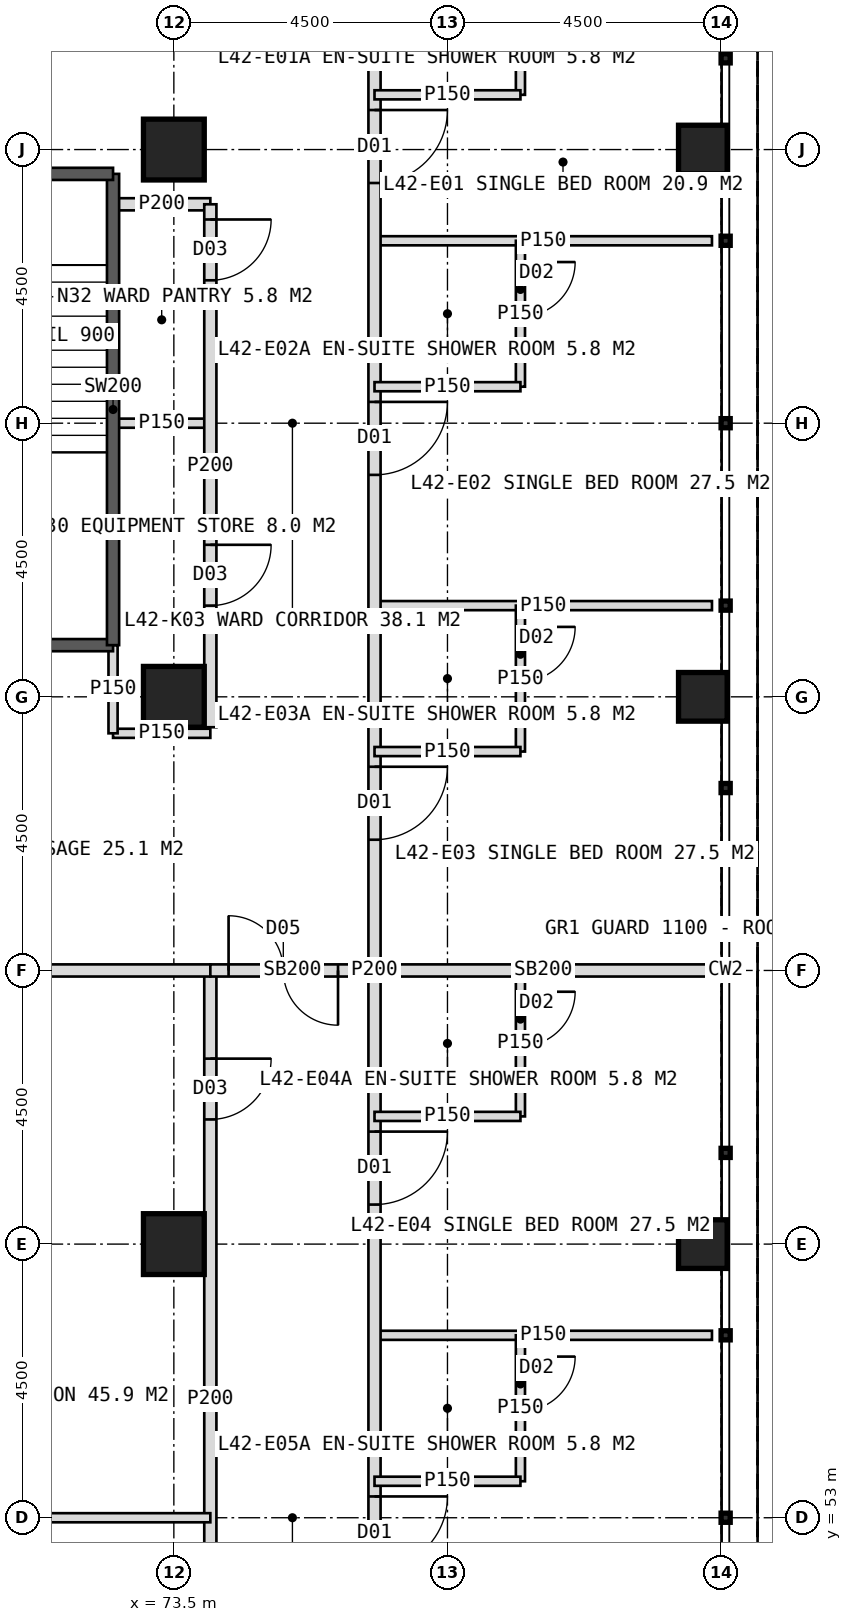
"""IFC4 building model, lengths in metres.
Left out: names, types, materials, properties, quantities, classifications, styles, units other than length and angle.
Written with IfcOpenShell. Run it as: python <this file> out.ifc"""

import sys

from ifc_helpers import new_model, si_unit, direction, frame, frame_2d, origin, origin_2d, place, context, subcontext, project, spatial, rectangle, hollow_rectangle, extrude, element, fill, save


model = new_model("IFC4")
c1 = context("Model", 3, precision=1e-05, world=origin(), true_north=direction((0.0, 1.0)))
c2 = subcontext(c1, "Body", "Model", "MODEL_VIEW")
j1 = project(units=[si_unit("LENGTHUNIT", "METRE"), si_unit("PLANEANGLEUNIT", "RADIAN")], contexts=[c1])
p1 = place(None, origin())
s1 = spatial("IfcSite", under=j1, at=p1, CompositionType="ELEMENT")
p2 = place(p1, origin())
s2 = spatial("IfcBuilding", under=s1, at=p2, CompositionType="ELEMENT")
p3 = place(p2, frame((0.0, 0.0, 177.0)))
s3 = spatial("IfcBuildingStorey", under=s2, at=p3, CompositionType="ELEMENT", Elevation=177.0)
for number, where, z_axis, x_axis in (
    (1, (73.5, 75.5, 0.0), (0.0, 0.0, 1.0), (1.0, 0.0, 0.0)),
    (2, (73.5, 57.5, 0.0), (0.0, 0.0, 1.0), (1.0, 0.0, 0.0)),
    (3, (73.5, 66.5, 0.0), (0.0, 0.0, 1.0), (1.0, 0.0, 0.0)),
):
    element("IfcColumn", number, at=place(p3, frame(where, z_axis=z_axis, x_axis=x_axis)), inside=s3, PredefinedType="COLUMN", context=c2, shape_type="SweptSolid", body=[
        extrude(hollow_rectangle(XDim=1.0, YDim=1.0, WallThickness=0.1, at=origin_2d()), origin(), (0.0, 0.0, 1.0), 4.0),
    ])
for number, where, z_axis, x_axis in (
    (4, (82.2, 57.5, 0.0), (0.0, 0.0, 1.0), (1.0, 0.0, 0.0)),
    (5, (82.2, 66.5, 0.0), (0.0, 0.0, 1.0), (1.0, 0.0, 0.0)),
    (6, (82.2, 75.5, 0.0), (0.0, 0.0, 1.0), (1.0, 0.0, 0.0)),
):
    element("IfcColumn", number, at=place(p3, frame(where, z_axis=z_axis, x_axis=x_axis)), inside=s3, PredefinedType="COLUMN", context=c2, shape_type="SweptSolid", body=[
        extrude(hollow_rectangle(XDim=0.8, YDim=0.8, WallThickness=0.08, at=origin_2d()), origin(), (0.0, 0.0, 1.0), 4.0),
    ])
p4 = place(p3, frame((72.5, 74.6, 0.0), z_axis=(0.0, 0.0, 1.0), x_axis=(1.0, 0.0, 0.0)))
e7 = element("IfcWall", 7, at=p4, inside=s3, PredefinedType="PARTITIONING", context=c2, shape_type="SweptSolid", body=[
    extrude(rectangle(XDim=1.6, YDim=0.2, at=frame_2d((0.8, 0.0))), origin(), (0.0, 0.0, 1.0), 3.75),
])
for number, where, z_axis, x_axis in (
    (8, (76.8, 74.0, 0.0), (0.0, 0.0, 1.0), (1.0, 0.0, 0.0)),
    (9, (76.8, 68.0, 0.0), (0.0, 0.0, 1.0), (1.0, 0.0, 0.0)),
):
    element("IfcWall", number, at=place(p3, frame(where, z_axis=z_axis, x_axis=x_axis)), inside=s3, PredefinedType="PARTITIONING", context=c2, shape_type="SweptSolid", body=[
        extrude(rectangle(XDim=5.55, YDim=0.15, at=frame_2d((2.775, 0.0))), origin(), (0.0, 0.0, 1.0), 3.75),
    ])
p5 = place(p3, frame((76.8, 62.0, 0.0), z_axis=(0.0, 0.0, 1.0), x_axis=(1.0, 0.0, 0.0)))
e10 = element("IfcWall", 10, at=p5, inside=s3, PredefinedType="SOLIDWALL", context=c2, shape_type="SweptSolid", body=[
    extrude(rectangle(XDim=5.55, YDim=0.2, at=frame_2d((2.775, 0.0))), origin(), (0.0, 0.0, 1.0), 2.95),
])
p6 = place(p3, frame((76.8, 56.0, 0.0), z_axis=(0.0, 0.0, 1.0), x_axis=(1.0, 0.0, 0.0)))
e11 = element("IfcWall", 11, at=p6, inside=s3, PredefinedType="PARTITIONING", context=c2, shape_type="SweptSolid", body=[
    extrude(rectangle(XDim=5.55, YDim=0.15, at=frame_2d((2.775, 0.0))), origin(), (0.0, 0.0, 1.0), 3.75),
])
p7 = place(p3, frame((76.8, 78.8, 0.0), z_axis=(0.0, 0.0, 1.0), x_axis=(0.0, -1.0, 0.0)))
e12 = element("IfcWall", 12, at=p7, inside=s3, PredefinedType="PARTITIONING", context=c2, shape_type="SweptSolid", body=[
    extrude(rectangle(XDim=33.6, YDim=0.2, at=frame_2d((16.8, 0.0))), origin(), (0.0, 0.0, 1.0), 3.75),
])
p8 = place(p7, frame((2.65, 0.0, 0.0)))
e13 = element("IfcOpeningElement", 13, at=p8, cuts=e12, PredefinedType="OPENING", context=c2, shape_type="SweptSolid", body=[
    extrude(rectangle(XDim=1.2, YDim=2.2, at=frame_2d((0.6, 1.1))), frame((0.0, 0.11, 0.0), z_axis=(0.0, -1.0, 0.0), x_axis=(1.0, 0.0, 0.0)), (0.0, 0.0, 1.0), 0.22),
])
p9 = place(p7, frame((7.45, 0.0, 0.0)))
e14 = element("IfcOpeningElement", 14, at=p9, cuts=e12, PredefinedType="OPENING", context=c2, shape_type="SweptSolid", body=[
    extrude(rectangle(XDim=1.2, YDim=2.2, at=frame_2d((0.6, 1.1))), frame((0.0, 0.11, 0.0), z_axis=(0.0, -1.0, 0.0), x_axis=(1.0, 0.0, 0.0)), (0.0, 0.0, 1.0), 0.22),
])
p10 = place(p7, frame((13.45, 0.0, 0.0)))
e15 = element("IfcOpeningElement", 15, at=p10, cuts=e12, PredefinedType="OPENING", context=c2, shape_type="SweptSolid", body=[
    extrude(rectangle(XDim=1.2, YDim=2.2, at=frame_2d((0.6, 1.1))), frame((0.0, 0.11, 0.0), z_axis=(0.0, -1.0, 0.0), x_axis=(1.0, 0.0, 0.0)), (0.0, 0.0, 1.0), 0.22),
])
p11 = place(p7, frame((19.45, 0.0, 0.0)))
e16 = element("IfcOpeningElement", 16, at=p11, cuts=e12, PredefinedType="OPENING", context=c2, shape_type="SweptSolid", body=[
    extrude(rectangle(XDim=1.2, YDim=2.2, at=frame_2d((0.6, 1.1))), frame((0.0, 0.11, 0.0), z_axis=(0.0, -1.0, 0.0), x_axis=(1.0, 0.0, 0.0)), (0.0, 0.0, 1.0), 0.22),
])
p12 = place(p7, frame((25.45, 0.0, 0.0)))
e17 = element("IfcOpeningElement", 17, at=p12, cuts=e12, PredefinedType="OPENING", context=c2, shape_type="SweptSolid", body=[
    extrude(rectangle(XDim=1.2, YDim=2.2, at=frame_2d((0.6, 1.1))), frame((0.0, 0.11, 0.0), z_axis=(0.0, -1.0, 0.0), x_axis=(1.0, 0.0, 0.0)), (0.0, 0.0, 1.0), 0.22),
])
p13 = place(p3, frame((79.2, 78.8, 0.0), z_axis=(0.0, 0.0, 1.0), x_axis=(0.0, -1.0, 0.0)))
e18 = element("IfcWall", 18, at=p13, inside=s3, PredefinedType="PARTITIONING", context=c2, shape_type="SweptSolid", body=[
    extrude(rectangle(XDim=2.4, YDim=0.15, at=frame_2d((1.2, 0.0))), origin(), (0.0, 0.0, 1.0), 3.75),
])
p14 = place(p13, frame((0.35, 0.0, 0.0)))
e19 = element("IfcOpeningElement", 19, at=p14, cuts=e18, PredefinedType="OPENING", context=c2, shape_type="SweptSolid", body=[
    extrude(rectangle(XDim=0.9, YDim=2.1, at=frame_2d((0.45, 1.05))), frame((0.0, 0.085, 0.0), z_axis=(0.0, -1.0, 0.0), x_axis=(1.0, 0.0, 0.0)), (0.0, 0.0, 1.0), 0.17),
])
p15 = place(p3, frame((76.8, 76.4, 0.0), z_axis=(0.0, 0.0, 1.0), x_axis=(1.0, 0.0, 0.0)))
e20 = element("IfcWall", 20, at=p15, inside=s3, PredefinedType="PARTITIONING", context=c2, shape_type="SweptSolid", body=[
    extrude(rectangle(XDim=2.4, YDim=0.15, at=frame_2d((1.2, 0.0))), origin(), (0.0, 0.0, 1.0), 3.75),
])
p16 = place(p3, frame((79.2, 74.0, 0.0), z_axis=(0.0, 0.0, 1.0), x_axis=(0.0, -1.0, 0.0)))
e21 = element("IfcWall", 21, at=p16, inside=s3, PredefinedType="PARTITIONING", context=c2, shape_type="SweptSolid", body=[
    extrude(rectangle(XDim=2.4, YDim=0.15, at=frame_2d((1.2, 0.0))), origin(), (0.0, 0.0, 1.0), 3.75),
])
p17 = place(p16, frame((0.35, 0.0, 0.0)))
e22 = element("IfcOpeningElement", 22, at=p17, cuts=e21, PredefinedType="OPENING", context=c2, shape_type="SweptSolid", body=[
    extrude(rectangle(XDim=0.9, YDim=2.1, at=frame_2d((0.45, 1.05))), frame((0.0, 0.085, 0.0), z_axis=(0.0, -1.0, 0.0), x_axis=(1.0, 0.0, 0.0)), (0.0, 0.0, 1.0), 0.17),
])
p18 = place(p3, frame((76.8, 71.6, 0.0), z_axis=(0.0, 0.0, 1.0), x_axis=(1.0, 0.0, 0.0)))
e23 = element("IfcWall", 23, at=p18, inside=s3, PredefinedType="PARTITIONING", context=c2, shape_type="SweptSolid", body=[
    extrude(rectangle(XDim=2.4, YDim=0.15, at=frame_2d((1.2, 0.0))), origin(), (0.0, 0.0, 1.0), 3.75),
])
p19 = place(p3, frame((79.2, 68.0, 0.0), z_axis=(0.0, 0.0, 1.0), x_axis=(0.0, -1.0, 0.0)))
e24 = element("IfcWall", 24, at=p19, inside=s3, PredefinedType="PARTITIONING", context=c2, shape_type="SweptSolid", body=[
    extrude(rectangle(XDim=2.4, YDim=0.15, at=frame_2d((1.2, 0.0))), origin(), (0.0, 0.0, 1.0), 3.75),
])
p20 = place(p19, frame((0.35, 0.0, 0.0)))
e25 = element("IfcOpeningElement", 25, at=p20, cuts=e24, PredefinedType="OPENING", context=c2, shape_type="SweptSolid", body=[
    extrude(rectangle(XDim=0.9, YDim=2.1, at=frame_2d((0.45, 1.05))), frame((0.0, 0.085, 0.0), z_axis=(0.0, -1.0, 0.0), x_axis=(1.0, 0.0, 0.0)), (0.0, 0.0, 1.0), 0.17),
])
p21 = place(p3, frame((76.8, 65.6, 0.0), z_axis=(0.0, 0.0, 1.0), x_axis=(1.0, 0.0, 0.0)))
e26 = element("IfcWall", 26, at=p21, inside=s3, PredefinedType="PARTITIONING", context=c2, shape_type="SweptSolid", body=[
    extrude(rectangle(XDim=2.4, YDim=0.15, at=frame_2d((1.2, 0.0))), origin(), (0.0, 0.0, 1.0), 3.75),
])
p22 = place(p3, frame((79.2, 62.0, 0.0), z_axis=(0.0, 0.0, 1.0), x_axis=(0.0, -1.0, 0.0)))
e27 = element("IfcWall", 27, at=p22, inside=s3, PredefinedType="PARTITIONING", context=c2, shape_type="SweptSolid", body=[
    extrude(rectangle(XDim=2.4, YDim=0.15, at=frame_2d((1.2, 0.0))), origin(), (0.0, 0.0, 1.0), 3.75),
])
p23 = place(p22, frame((0.35, 0.0, 0.0)))
e28 = element("IfcOpeningElement", 28, at=p23, cuts=e27, PredefinedType="OPENING", context=c2, shape_type="SweptSolid", body=[
    extrude(rectangle(XDim=0.9, YDim=2.1, at=frame_2d((0.45, 1.05))), frame((0.0, 0.085, 0.0), z_axis=(0.0, -1.0, 0.0), x_axis=(1.0, 0.0, 0.0)), (0.0, 0.0, 1.0), 0.17),
])
p24 = place(p3, frame((76.8, 59.6, 0.0), z_axis=(0.0, 0.0, 1.0), x_axis=(1.0, 0.0, 0.0)))
e29 = element("IfcWall", 29, at=p24, inside=s3, PredefinedType="PARTITIONING", context=c2, shape_type="SweptSolid", body=[
    extrude(rectangle(XDim=2.4, YDim=0.15, at=frame_2d((1.2, 0.0))), origin(), (0.0, 0.0, 1.0), 3.75),
])
p25 = place(p3, frame((79.2, 56.0, 0.0), z_axis=(0.0, 0.0, 1.0), x_axis=(0.0, -1.0, 0.0)))
e30 = element("IfcWall", 30, at=p25, inside=s3, PredefinedType="PARTITIONING", context=c2, shape_type="SweptSolid", body=[
    extrude(rectangle(XDim=2.4, YDim=0.15, at=frame_2d((1.2, 0.0))), origin(), (0.0, 0.0, 1.0), 3.75),
])
p26 = place(p25, frame((0.35, 0.0, 0.0)))
e31 = element("IfcOpeningElement", 31, at=p26, cuts=e30, PredefinedType="OPENING", context=c2, shape_type="SweptSolid", body=[
    extrude(rectangle(XDim=0.9, YDim=2.1, at=frame_2d((0.45, 1.05))), frame((0.0, 0.085, 0.0), z_axis=(0.0, -1.0, 0.0), x_axis=(1.0, 0.0, 0.0)), (0.0, 0.0, 1.0), 0.17),
])
p27 = place(p3, frame((76.8, 53.6, 0.0), z_axis=(0.0, 0.0, 1.0), x_axis=(1.0, 0.0, 0.0)))
e32 = element("IfcWall", 32, at=p27, inside=s3, PredefinedType="PARTITIONING", context=c2, shape_type="SweptSolid", body=[
    extrude(rectangle(XDim=2.4, YDim=0.15, at=frame_2d((1.2, 0.0))), origin(), (0.0, 0.0, 1.0), 3.75),
])
p28 = place(p3, frame((72.5, 71.0, 0.0), z_axis=(0.0, 0.0, 1.0), x_axis=(1.0, 0.0, 0.0)))
e33 = element("IfcWall", 33, at=p28, inside=s3, PredefinedType="PARTITIONING", context=c2, shape_type="SweptSolid", body=[
    extrude(rectangle(XDim=1.6, YDim=0.15, at=frame_2d((0.8, 0.0))), origin(), (0.0, 0.0, 1.0), 3.75),
])
p29 = place(p3, frame((74.1, 74.6, 0.0), z_axis=(0.0, 0.0, 1.0), x_axis=(0.0, -1.0, 0.0)))
e34 = element("IfcWall", 34, at=p29, inside=s3, PredefinedType="PARTITIONING", context=c2, shape_type="SweptSolid", body=[
    extrude(rectangle(XDim=8.6, YDim=0.2, at=frame_2d((4.3, 0.0))), origin(), (0.0, 0.0, 1.0), 3.75),
])
p30 = place(p29, frame((0.25, 0.0, 0.0)))
e35 = element("IfcOpeningElement", 35, at=p30, cuts=e34, PredefinedType="OPENING", context=c2, shape_type="SweptSolid", body=[
    extrude(rectangle(XDim=1.0, YDim=2.1, at=frame_2d((0.5, 1.05))), frame((0.0, 0.11, 0.0), z_axis=(0.0, -1.0, 0.0), x_axis=(1.0, 0.0, 0.0)), (0.0, 0.0, 1.0), 0.22),
])
p31 = place(p29, frame((5.6, 0.0, 0.0)))
e36 = element("IfcOpeningElement", 36, at=p31, cuts=e34, PredefinedType="OPENING", context=c2, shape_type="SweptSolid", body=[
    extrude(rectangle(XDim=1.0, YDim=2.1, at=frame_2d((0.5, 1.05))), frame((0.0, 0.11, 0.0), z_axis=(0.0, -1.0, 0.0), x_axis=(1.0, 0.0, 0.0)), (0.0, 0.0, 1.0), 0.22),
])
p32 = place(p3, frame((74.1, 62.0, 0.0), z_axis=(0.0, 0.0, 1.0), x_axis=(0.0, -1.0, 0.0)))
e37 = element("IfcWall", 37, at=p32, inside=s3, PredefinedType="PARTITIONING", context=c2, shape_type="SweptSolid", body=[
    extrude(rectangle(XDim=14.1, YDim=0.2, at=frame_2d((7.05, 0.0))), origin(), (0.0, 0.0, 1.0), 3.75),
])
p33 = place(p32, frame((1.45, 0.0, 0.0)))
e38 = element("IfcOpeningElement", 38, at=p33, cuts=e37, PredefinedType="OPENING", context=c2, shape_type="SweptSolid", body=[
    extrude(rectangle(XDim=1.0, YDim=2.1, at=frame_2d((0.5, 1.05))), frame((0.0, 0.11, 0.0), z_axis=(0.0, -1.0, 0.0), x_axis=(1.0, 0.0, 0.0)), (0.0, 0.0, 1.0), 0.22),
])
p34 = place(p32, frame((11.05, 0.0, 0.0)))
e39 = element("IfcOpeningElement", 39, at=p34, cuts=e37, PredefinedType="OPENING", context=c2, shape_type="SweptSolid", body=[
    extrude(rectangle(XDim=1.0, YDim=2.1, at=frame_2d((0.5, 1.05))), frame((0.0, 0.11, 0.0), z_axis=(0.0, -1.0, 0.0), x_axis=(1.0, 0.0, 0.0)), (0.0, 0.0, 1.0), 0.22),
])
p35 = place(p3, frame((72.5, 65.9, 0.0), z_axis=(0.0, 0.0, 1.0), x_axis=(1.0, 0.0, 0.0)))
e40 = element("IfcWall", 40, at=p35, inside=s3, PredefinedType="PARTITIONING", context=c2, shape_type="SweptSolid", body=[
    extrude(rectangle(XDim=1.6, YDim=0.15, at=frame_2d((0.8, 0.0))), origin(), (0.0, 0.0, 1.0), 3.75),
])
p36 = place(p3, frame((69.0, 62.0, 0.0), z_axis=(0.0, 0.0, 1.0), x_axis=(1.0, 0.0, 0.0)))
e41 = element("IfcWall", 41, at=p36, inside=s3, PredefinedType="SOLIDWALL", context=c2, shape_type="SweptSolid", body=[
    extrude(rectangle(XDim=5.1, YDim=0.2, at=frame_2d((2.55, 0.0))), origin(), (0.0, 0.0, 1.0), 2.95),
])
p37 = place(p3, frame((69.0, 53.0, 0.0), z_axis=(0.0, 0.0, 1.0), x_axis=(1.0, 0.0, 0.0)))
e42 = element("IfcWall", 42, at=p37, inside=s3, PredefinedType="PARTITIONING", context=c2, shape_type="SweptSolid", body=[
    extrude(rectangle(XDim=5.1, YDim=0.15, at=frame_2d((2.55, 0.0))), origin(), (0.0, 0.0, 1.0), 3.75),
])
p38 = place(p3, frame((74.1, 62.0, 0.0), z_axis=(0.0, 0.0, 1.0), x_axis=(1.0, 0.0, 0.0)))
e43 = element("IfcWall", 43, at=p38, inside=s3, PredefinedType="SOLIDWALL", context=c2, shape_type="SweptSolid", body=[
    extrude(rectangle(XDim=2.7, YDim=0.2, at=frame_2d((1.35, 0.0))), origin(), (0.0, 0.0, 1.0), 2.95),
])
p39 = place(p38, frame((0.3, 0.0, 0.0)))
e44 = element("IfcOpeningElement", 44, at=p39, cuts=e43, PredefinedType="OPENING", context=c2, shape_type="SweptSolid", body=[
    extrude(rectangle(XDim=1.8, YDim=2.2, at=frame_2d((0.9, 1.1))), frame((0.0, 0.11, 0.0), z_axis=(0.0, -1.0, 0.0), x_axis=(1.0, 0.0, 0.0)), (0.0, 0.0, 1.0), 0.22),
])
p40 = place(p3, frame((72.5, 65.9, 0.0), z_axis=(0.0, 0.0, 1.0), x_axis=(0.0, 1.0, 0.0)))
e45 = element("IfcWall", 45, at=p40, inside=s3, PredefinedType="PARTITIONING", context=c2, shape_type="SweptSolid", body=[
    extrude(rectangle(XDim=1.45, YDim=0.15, at=frame_2d((0.725, 0.0))), origin(), (0.0, 0.0, 1.0), 3.75),
])
p41 = place(p3, frame((69.0, 67.35, 0.0), z_axis=(0.0, 0.0, 1.0), x_axis=(1.0, 0.0, 0.0)))
e46 = element("IfcWall", 46, at=p41, inside=s3, PredefinedType="SOLIDWALL", context=c2, shape_type="SweptSolid", body=[
    extrude(rectangle(XDim=3.5, YDim=0.2, at=frame_2d((1.75, 0.0))), origin(), (0.0, 0.0, 1.0), 3.75),
])
p42 = place(p3, frame((72.5, 67.35, 0.0), z_axis=(0.0, 0.0, 1.0), x_axis=(0.0, 1.0, 0.0)))
e47 = element("IfcWall", 47, at=p42, inside=s3, PredefinedType="SOLIDWALL", context=c2, shape_type="SweptSolid", body=[
    extrude(rectangle(XDim=7.75, YDim=0.2, at=frame_2d((3.875, 0.0))), origin(), (0.0, 0.0, 1.0), 3.75),
])
p43 = place(p3, frame((69.0, 75.1, 0.0), z_axis=(0.0, 0.0, 1.0), x_axis=(1.0, 0.0, 0.0)))
e48 = element("IfcWall", 48, at=p43, inside=s3, PredefinedType="SOLIDWALL", context=c2, shape_type="SweptSolid", body=[
    extrude(rectangle(XDim=3.5, YDim=0.2, at=frame_2d((1.75, 0.0))), origin(), (0.0, 0.0, 1.0), 3.75),
])
p44 = place(p43, frame((1.15, 0.0, 0.0)))
e49 = element("IfcOpeningElement", 49, at=p44, cuts=e48, PredefinedType="OPENING", context=c2, shape_type="SweptSolid", body=[
    extrude(rectangle(XDim=1.2, YDim=2.1, at=frame_2d((0.6, 1.05))), frame((0.0, 0.11, 0.0), z_axis=(0.0, -1.0, 0.0), x_axis=(1.0, 0.0, 0.0)), (0.0, 0.0, 1.0), 0.22),
])
p45 = place(p30, origin())
e50 = element("IfcDoor", 50, at=p45, inside=s3, OperationType="SINGLE_SWING_LEFT", PredefinedType="DOOR", context=c2, shape_type="SweptSolid", body=[
    extrude(rectangle(XDim=1.0, YDim=2.1, at=frame_2d((0.5, 1.05))), frame((0.0, 0.025, 0.0), z_axis=(0.0, -1.0, 0.0), x_axis=(1.0, 0.0, 0.0)), (0.0, 0.0, 1.0), 0.05),
])
fill(e35, e50)
p46 = place(p8, origin())
e51 = element("IfcDoor", 51, at=p46, inside=s3, OperationType="SINGLE_SWING_LEFT", PredefinedType="DOOR", context=c2, shape_type="SweptSolid", body=[
    extrude(rectangle(XDim=1.2, YDim=2.2, at=frame_2d((0.6, 1.1))), frame((0.0, 0.025, 0.0), z_axis=(0.0, -1.0, 0.0), x_axis=(1.0, 0.0, 0.0)), (0.0, 0.0, 1.0), 0.05),
])
fill(e13, e51)
p47 = place(p9, origin())
e52 = element("IfcDoor", 52, at=p47, inside=s3, OperationType="SINGLE_SWING_LEFT", PredefinedType="DOOR", context=c2, shape_type="SweptSolid", body=[
    extrude(rectangle(XDim=1.2, YDim=2.2, at=frame_2d((0.6, 1.1))), frame((0.0, 0.025, 0.0), z_axis=(0.0, -1.0, 0.0), x_axis=(1.0, 0.0, 0.0)), (0.0, 0.0, 1.0), 0.05),
])
fill(e14, e52)
p48 = place(p17, origin())
e53 = element("IfcDoor", 53, at=p48, inside=s3, OperationType="SINGLE_SWING_LEFT", PredefinedType="DOOR", context=c2, shape_type="SweptSolid", body=[
    extrude(rectangle(XDim=0.9, YDim=2.1, at=frame_2d((0.45, 1.05))), frame((0.0, 0.025, 0.0), z_axis=(0.0, -1.0, 0.0), x_axis=(1.0, 0.0, 0.0)), (0.0, 0.0, 1.0), 0.05),
])
fill(e22, e53)
p49 = place(p10, origin())
e54 = element("IfcDoor", 54, at=p49, inside=s3, OperationType="SINGLE_SWING_LEFT", PredefinedType="DOOR", context=c2, shape_type="SweptSolid", body=[
    extrude(rectangle(XDim=1.2, YDim=2.2, at=frame_2d((0.6, 1.1))), frame((0.0, 0.025, 0.0), z_axis=(0.0, -1.0, 0.0), x_axis=(1.0, 0.0, 0.0)), (0.0, 0.0, 1.0), 0.05),
])
fill(e15, e54)
p50 = place(p20, origin())
e55 = element("IfcDoor", 55, at=p50, inside=s3, OperationType="SINGLE_SWING_LEFT", PredefinedType="DOOR", context=c2, shape_type="SweptSolid", body=[
    extrude(rectangle(XDim=0.9, YDim=2.1, at=frame_2d((0.45, 1.05))), frame((0.0, 0.025, 0.0), z_axis=(0.0, -1.0, 0.0), x_axis=(1.0, 0.0, 0.0)), (0.0, 0.0, 1.0), 0.05),
])
fill(e25, e55)
p51 = place(p11, origin())
e56 = element("IfcDoor", 56, at=p51, inside=s3, OperationType="SINGLE_SWING_LEFT", PredefinedType="DOOR", context=c2, shape_type="SweptSolid", body=[
    extrude(rectangle(XDim=1.2, YDim=2.2, at=frame_2d((0.6, 1.1))), frame((0.0, 0.025, 0.0), z_axis=(0.0, -1.0, 0.0), x_axis=(1.0, 0.0, 0.0)), (0.0, 0.0, 1.0), 0.05),
])
fill(e16, e56)
p52 = place(p23, origin())
e57 = element("IfcDoor", 57, at=p52, inside=s3, OperationType="SINGLE_SWING_LEFT", PredefinedType="DOOR", context=c2, shape_type="SweptSolid", body=[
    extrude(rectangle(XDim=0.9, YDim=2.1, at=frame_2d((0.45, 1.05))), frame((0.0, 0.025, 0.0), z_axis=(0.0, -1.0, 0.0), x_axis=(1.0, 0.0, 0.0)), (0.0, 0.0, 1.0), 0.05),
])
fill(e28, e57)
p53 = place(p12, origin())
e58 = element("IfcDoor", 58, at=p53, inside=s3, OperationType="SINGLE_SWING_LEFT", PredefinedType="DOOR", context=c2, shape_type="SweptSolid", body=[
    extrude(rectangle(XDim=1.2, YDim=2.2, at=frame_2d((0.6, 1.1))), frame((0.0, 0.025, 0.0), z_axis=(0.0, -1.0, 0.0), x_axis=(1.0, 0.0, 0.0)), (0.0, 0.0, 1.0), 0.05),
])
fill(e17, e58)
p54 = place(p26, origin())
e59 = element("IfcDoor", 59, at=p54, inside=s3, OperationType="SINGLE_SWING_LEFT", PredefinedType="DOOR", context=c2, shape_type="SweptSolid", body=[
    extrude(rectangle(XDim=0.9, YDim=2.1, at=frame_2d((0.45, 1.05))), frame((0.0, 0.025, 0.0), z_axis=(0.0, -1.0, 0.0), x_axis=(1.0, 0.0, 0.0)), (0.0, 0.0, 1.0), 0.05),
])
fill(e31, e59)
p55 = place(p31, origin())
e60 = element("IfcDoor", 60, at=p55, inside=s3, OperationType="SINGLE_SWING_LEFT", PredefinedType="DOOR", context=c2, shape_type="SweptSolid", body=[
    extrude(rectangle(XDim=1.0, YDim=2.1, at=frame_2d((0.5, 1.05))), frame((0.0, 0.025, 0.0), z_axis=(0.0, -1.0, 0.0), x_axis=(1.0, 0.0, 0.0)), (0.0, 0.0, 1.0), 0.05),
])
fill(e36, e60)
p56 = place(p33, origin())
e61 = element("IfcDoor", 61, at=p56, inside=s3, OperationType="SINGLE_SWING_LEFT", PredefinedType="DOOR", context=c2, shape_type="SweptSolid", body=[
    extrude(rectangle(XDim=1.0, YDim=2.1, at=frame_2d((0.5, 1.05))), frame((0.0, 0.025, 0.0), z_axis=(0.0, -1.0, 0.0), x_axis=(1.0, 0.0, 0.0)), (0.0, 0.0, 1.0), 0.05),
])
fill(e38, e61)
p57 = place(p39, origin())
e62 = element("IfcDoor", 62, at=p57, inside=s3, OperationType="DOUBLE_DOOR_DOUBLE_SWING", PredefinedType="DOOR", context=c2, shape_type="SweptSolid", body=[
    extrude(rectangle(XDim=1.8, YDim=2.2, at=frame_2d((0.9, 1.1))), frame((0.0, 0.025, 0.0), z_axis=(0.0, -1.0, 0.0), x_axis=(1.0, 0.0, 0.0)), (0.0, 0.0, 1.0), 0.05),
])
fill(e44, e62)
save(model, sys.argv[1])
